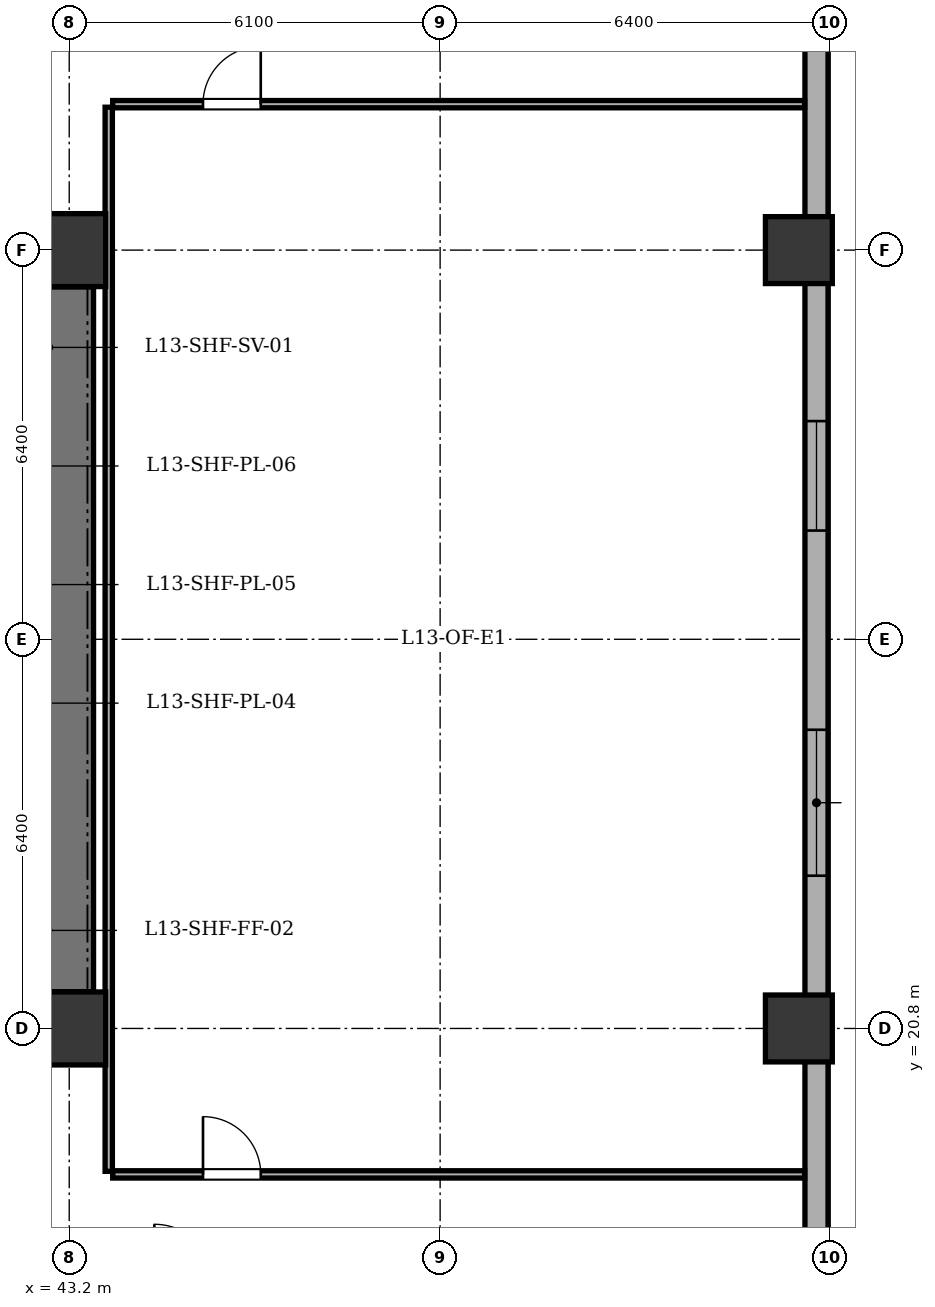
"""IFC4 building model, lengths in metres.
Left out: names, types, materials, properties, quantities, classifications, styles, units other than length and angle.
Written with IfcOpenShell. Run it as: python <this file> out.ifc"""

import sys

from ifc_helpers import new_model, si_unit, direction, frame, frame_2d, origin, origin_2d, place, context, subcontext, project, spatial, rectangle, extrude, element, fill, save


model = new_model("IFC4")
c1 = context("Model", 3, precision=1e-05, world=origin(), true_north=direction((0.0, 1.0)))
c2 = subcontext(c1, "Body", "Model", "MODEL_VIEW")
j1 = project(units=[si_unit("LENGTHUNIT", "METRE"), si_unit("PLANEANGLEUNIT", "RADIAN")], contexts=[c1])
p1 = place(None, origin())
s1 = spatial("IfcSite", under=j1, at=p1, CompositionType="ELEMENT")
p2 = place(p1, origin())
s2 = spatial("IfcBuilding", under=s1, at=p2, CompositionType="ELEMENT")
p3 = place(p2, frame((0.0, 0.0, 55.5)))
s3 = spatial("IfcBuildingStorey", under=s2, at=p3, CompositionType="ELEMENT", Elevation=55.5)
for number, where, z_axis, x_axis in (
    (1, (43.2, 20.8, 0.0), (0.0, 0.0, 1.0), (1.0, 0.0, 0.0)),
    (2, (43.2, 33.6, 0.0), (0.0, 0.0, 1.0), (1.0, 0.0, 0.0)),
):
    element("IfcColumn", number, at=place(p3, frame(where, z_axis=z_axis, x_axis=x_axis)), inside=s3, PredefinedType="COLUMN", context=c2, shape_type="SweptSolid", body=[
        extrude(rectangle(XDim=1.2, YDim=1.2, at=origin_2d()), origin(), (0.0, 0.0, 1.0), 3.9),
    ])
for number, where, z_axis, x_axis in (
    (3, (55.2, 20.8, 0.0), (0.0, 0.0, 1.0), (1.0, 0.0, 0.0)),
    (4, (55.2, 33.6, 0.0), (0.0, 0.0, 1.0), (1.0, 0.0, 0.0)),
):
    element("IfcColumn", number, at=place(p3, frame(where, z_axis=z_axis, x_axis=x_axis)), inside=s3, PredefinedType="COLUMN", context=c2, shape_type="SweptSolid", body=[
        extrude(rectangle(XDim=1.1, YDim=1.1, at=origin_2d()), origin(), (0.0, 0.0, 1.0), 3.9),
    ])
p4 = place(p3, frame((55.49, 41.5, 0.0), z_axis=(0.0, 0.0, 1.0), x_axis=(0.0, -1.0, 0.0)))
e5 = element("IfcWall", 5, at=p4, inside=s3, PredefinedType="STANDARD", context=c2, shape_type="SweptSolid", body=[
    extrude(rectangle(XDim=35.0, YDim=0.38, at=frame_2d((17.5, 0.0))), origin(), (0.0, 0.0, 1.0), 3.135),
])
p5 = place(p4, frame((2.025, 0.0, 0.8)))
e6 = element("IfcOpeningElement", 6, at=p5, cuts=e5, PredefinedType="OPENING", context=c2, shape_type="SweptSolid", body=[
    extrude(rectangle(XDim=1.8, YDim=1.9, at=frame_2d((0.9, 0.95))), frame((0.0, 0.2, 0.0), z_axis=(0.0, -1.0, 0.0), x_axis=(1.0, 0.0, 0.0)), (0.0, 0.0, 1.0), 0.4),
])
p6 = place(p4, frame((10.712, 0.0, 0.8)))
e7 = element("IfcOpeningElement", 7, at=p6, cuts=e5, PredefinedType="OPENING", context=c2, shape_type="SweptSolid", body=[
    extrude(rectangle(XDim=1.8, YDim=1.9, at=frame_2d((0.9, 0.95))), frame((0.0, 0.2, 0.0), z_axis=(0.0, -1.0, 0.0), x_axis=(1.0, 0.0, 0.0)), (0.0, 0.0, 1.0), 0.4),
])
p7 = place(p4, frame((15.788, 0.0, 0.8)))
e8 = element("IfcOpeningElement", 8, at=p7, cuts=e5, PredefinedType="OPENING", context=c2, shape_type="SweptSolid", body=[
    extrude(rectangle(XDim=2.4, YDim=1.9, at=frame_2d((1.2, 0.95))), frame((0.0, 0.2, 0.0), z_axis=(0.0, -1.0, 0.0), x_axis=(1.0, 0.0, 0.0)), (0.0, 0.0, 1.0), 0.4),
])
p8 = place(p4, frame((25.443, 0.0, 0.8)))
e9 = element("IfcOpeningElement", 9, at=p8, cuts=e5, PredefinedType="OPENING", context=c2, shape_type="SweptSolid", body=[
    extrude(rectangle(XDim=1.8, YDim=1.9, at=frame_2d((0.9, 0.95))), frame((0.0, 0.2, 0.0), z_axis=(0.0, -1.0, 0.0), x_axis=(1.0, 0.0, 0.0)), (0.0, 0.0, 1.0), 0.4),
])
p9 = place(p4, frame((30.207, 0.0, 0.8)))
e10 = element("IfcOpeningElement", 10, at=p9, cuts=e5, PredefinedType="OPENING", context=c2, shape_type="SweptSolid", body=[
    extrude(rectangle(XDim=2.4, YDim=1.9, at=frame_2d((1.2, 0.95))), frame((0.0, 0.2, 0.0), z_axis=(0.0, -1.0, 0.0), x_axis=(1.0, 0.0, 0.0)), (0.0, 0.0, 1.0), 0.4),
])
p10 = place(p3, frame((43.2, 21.405, 0.0), z_axis=(0.0, 0.0, 1.0), x_axis=(0.0, 1.0, 0.0)))
e11 = element("IfcWall", 11, at=p10, inside=s3, PredefinedType="SHEAR", context=c2, shape_type="SweptSolid", body=[
    extrude(rectangle(XDim=11.59, YDim=0.8, at=frame_2d((5.795, 0.0))), origin(), (0.0, 0.0, 1.0), 3.6),
])
p11 = place(p3, frame((43.85, 18.45, 0.0), z_axis=(0.0, 0.0, 1.0), x_axis=(0.0, 1.0, 0.0)))
e12 = element("IfcWall", 12, at=p11, inside=s3, PredefinedType="PARTITIONING", context=c2, shape_type="SweptSolid", body=[
    extrude(rectangle(XDim=17.5, YDim=0.12, at=frame_2d((8.75, 0.0))), origin(), (0.0, 0.0, 1.0), 3.6),
])
p12 = place(p3, frame((43.915, 18.4, 0.0), z_axis=(0.0, 0.0, 1.0), x_axis=(1.0, 0.0, 0.0)))
e13 = element("IfcWall", 13, at=p12, inside=s3, PredefinedType="PARTITIONING", context=c2, shape_type="SweptSolid", body=[
    extrude(rectangle(XDim=11.38, YDim=0.12, at=frame_2d((5.69, 0.0))), origin(), (0.0, 0.0, 1.0), 3.6),
])
p13 = place(p12, frame((1.485, 0.0, 0.0)))
e14 = element("IfcOpeningElement", 14, at=p13, cuts=e13, PredefinedType="OPENING", context=c2, shape_type="SweptSolid", body=[
    extrude(rectangle(XDim=0.95, YDim=2.1, at=frame_2d((0.475, 1.05))), frame((0.0, 0.07, 0.0), z_axis=(0.0, -1.0, 0.0), x_axis=(1.0, 0.0, 0.0)), (0.0, 0.0, 1.0), 0.14),
])
p14 = place(p3, frame((43.915, 36.0, 0.0), z_axis=(0.0, 0.0, 1.0), x_axis=(1.0, 0.0, 0.0)))
e15 = element("IfcWall", 15, at=p14, inside=s3, PredefinedType="PARTITIONING", context=c2, shape_type="SweptSolid", body=[
    extrude(rectangle(XDim=11.38, YDim=0.12, at=frame_2d((5.69, 0.0))), origin(), (0.0, 0.0, 1.0), 3.6),
])
p15 = place(p14, frame((1.485, 0.0, 0.0)))
e16 = element("IfcOpeningElement", 16, at=p15, cuts=e15, PredefinedType="OPENING", context=c2, shape_type="SweptSolid", body=[
    extrude(rectangle(XDim=0.95, YDim=2.1, at=frame_2d((0.475, 1.05))), frame((0.0, 0.07, 0.0), z_axis=(0.0, -1.0, 0.0), x_axis=(1.0, 0.0, 0.0)), (0.0, 0.0, 1.0), 0.14),
])
p16 = place(p6, origin())
e17 = element("IfcWindow", 17, at=p16, inside=s3, PartitioningType="SINGLE_PANEL", PredefinedType="WINDOW", context=c2, shape_type="SweptSolid", body=[
    extrude(rectangle(XDim=1.8, YDim=1.9, at=frame_2d((0.9, 0.95))), frame((0.0, -0.01, 0.0), z_axis=(0.0, -1.0, 0.0), x_axis=(1.0, 0.0, 0.0)), (0.0, 0.0, 1.0), 0.06),
])
fill(e7, e17)
p17 = place(p7, origin())
e18 = element("IfcWindow", 18, at=p17, inside=s3, PartitioningType="SINGLE_PANEL", PredefinedType="WINDOW", context=c2, shape_type="SweptSolid", body=[
    extrude(rectangle(XDim=2.4, YDim=1.9, at=frame_2d((1.2, 0.95))), frame((0.0, -0.01, 0.0), z_axis=(0.0, -1.0, 0.0), x_axis=(1.0, 0.0, 0.0)), (0.0, 0.0, 1.0), 0.06),
])
fill(e8, e18)
p18 = place(p13, origin())
e19 = element("IfcDoor", 19, at=p18, inside=s3, OperationType="SINGLE_SWING_LEFT", PredefinedType="DOOR", context=c2, shape_type="SweptSolid", body=[
    extrude(rectangle(XDim=0.95, YDim=2.1, at=frame_2d((0.475, 1.05))), frame((0.0, 0.025, 0.0), z_axis=(0.0, -1.0, 0.0), x_axis=(1.0, 0.0, 0.0)), (0.0, 0.0, 1.0), 0.05),
])
fill(e14, e19)
p19 = place(p15, origin())
e20 = element("IfcDoor", 20, at=p19, inside=s3, OperationType="SINGLE_SWING_RIGHT", PredefinedType="DOOR", context=c2, shape_type="SweptSolid", body=[
    extrude(rectangle(XDim=0.95, YDim=2.1, at=frame_2d((0.475, 1.05))), frame((0.0, 0.025, 0.0), z_axis=(0.0, -1.0, 0.0), x_axis=(1.0, 0.0, 0.0)), (0.0, 0.0, 1.0), 0.05),
])
fill(e16, e20)
save(model, sys.argv[1])
